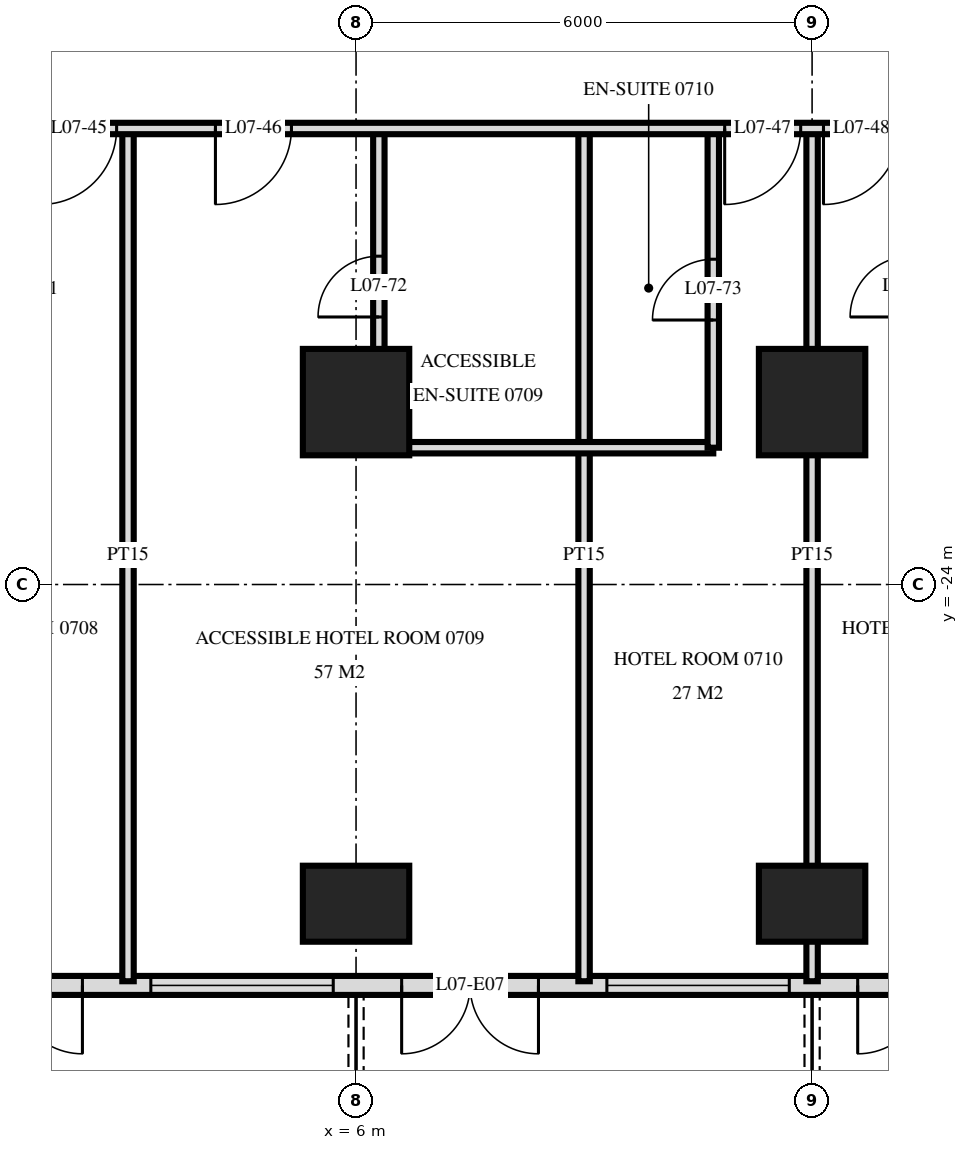
"""IFC4 building model, lengths in metres.
Left out: names, types, materials, properties, quantities, classifications, styles, units other than length and angle.
Written with IfcOpenShell. Run it as: python <this file> out.ifc"""

import sys

from ifc_helpers import new_model, si_unit, direction, frame, frame_2d, origin, origin_2d, place, context, subcontext, project, spatial, rectangle, extrude, element, fill, save


model = new_model("IFC4")
c1 = context("Model", 3, precision=1e-05, world=origin(), true_north=direction((0.0, 1.0)))
c2 = subcontext(c1, "Body", "Model", "MODEL_VIEW")
j1 = project(units=[si_unit("LENGTHUNIT", "METRE"), si_unit("PLANEANGLEUNIT", "RADIAN")], contexts=[c1])
p1 = place(None, origin())
s1 = spatial("IfcSite", under=j1, at=p1, CompositionType="ELEMENT")
p2 = place(p1, origin())
s2 = spatial("IfcBuilding", under=s1, at=p2, CompositionType="ELEMENT")
p3 = place(p2, frame((0.0, 0.0, 34.8)))
s3 = spatial("IfcBuildingStorey", under=s2, at=p3, CompositionType="ELEMENT", Elevation=34.8)
p4 = place(p3, frame((6.0, -28.2, 0.0), z_axis=(0.0, 0.0, 1.0), x_axis=(1.0, 0.0, 0.0)))
e1 = element("IfcColumn", 1, at=p4, inside=s3, PredefinedType="COLUMN", context=c2, shape_type="SweptSolid", body=[
    extrude(rectangle(XDim=1.4, YDim=1.0, at=origin_2d()), origin(), (0.0, 0.0, 1.0), 3.6),
])
p5 = place(p3, frame((6.0, -21.6, 0.0), z_axis=(0.0, 0.0, 1.0), x_axis=(1.0, 0.0, 0.0)))
e2 = element("IfcColumn", 2, at=p5, inside=s3, PredefinedType="COLUMN", context=c2, shape_type="SweptSolid", body=[
    extrude(rectangle(XDim=1.4, YDim=1.4, at=origin_2d()), origin(), (0.0, 0.0, 1.0), 3.6),
])
p6 = place(p3, frame((12.0, -28.2, 0.0), z_axis=(0.0, 0.0, 1.0), x_axis=(1.0, 0.0, 0.0)))
e3 = element("IfcColumn", 3, at=p6, inside=s3, PredefinedType="COLUMN", context=c2, shape_type="SweptSolid", body=[
    extrude(rectangle(XDim=1.4, YDim=1.0, at=origin_2d()), origin(), (0.0, 0.0, 1.0), 3.6),
])
p7 = place(p3, frame((12.0, -21.6, 0.0), z_axis=(0.0, 0.0, 1.0), x_axis=(1.0, 0.0, 0.0)))
e4 = element("IfcColumn", 4, at=p7, inside=s3, PredefinedType="COLUMN", context=c2, shape_type="SweptSolid", body=[
    extrude(rectangle(XDim=1.4, YDim=1.4, at=origin_2d()), origin(), (0.0, 0.0, 1.0), 3.6),
])
p8 = place(p3, frame((-28.775, -29.275, 0.0), z_axis=(0.0, 0.0, 1.0), x_axis=(1.0, 0.0, 0.0)))
e5 = element("IfcWall", 5, at=p8, inside=s3, PredefinedType="SOLIDWALL", context=c2, shape_type="SweptSolid", body=[
    extrude(rectangle(XDim=57.551, YDim=0.25, at=frame_2d((28.775, 0.0))), origin(), (0.0, 0.0, 1.0), 3.32),
])
p9 = place(p8, frame((0.575, 0.0, 0.0)))
e6 = element("IfcOpeningElement", 6, at=p9, cuts=e5, PredefinedType="OPENING", context=c2, shape_type="SweptSolid", body=[
    extrude(rectangle(XDim=1.8, YDim=2.4, at=frame_2d((0.9, 1.2))), frame((0.0, 0.135, 0.0), z_axis=(0.0, -1.0, 0.0), x_axis=(1.0, 0.0, 0.0)), (0.0, 0.0, 1.0), 0.27),
])
p10 = place(p8, frame((5.375, 0.0, 0.0)))
e7 = element("IfcOpeningElement", 7, at=p10, cuts=e5, PredefinedType="OPENING", context=c2, shape_type="SweptSolid", body=[
    extrude(rectangle(XDim=1.8, YDim=2.4, at=frame_2d((0.9, 1.2))), frame((0.0, 0.135, 0.0), z_axis=(0.0, -1.0, 0.0), x_axis=(1.0, 0.0, 0.0)), (0.0, 0.0, 1.0), 0.27),
])
p11 = place(p8, frame((8.075, 0.0, 0.3)))
e8 = element("IfcOpeningElement", 8, at=p11, cuts=e5, PredefinedType="OPENING", context=c2, shape_type="SweptSolid", body=[
    extrude(rectangle(XDim=2.4, YDim=2.1, at=frame_2d((1.2, 1.05))), frame((0.0, 0.135, 0.0), z_axis=(0.0, -1.0, 0.0), x_axis=(1.0, 0.0, 0.0)), (0.0, 0.0, 1.0), 0.27),
])
p12 = place(p8, frame((11.375, 0.0, 0.0)))
e9 = element("IfcOpeningElement", 9, at=p12, cuts=e5, PredefinedType="OPENING", context=c2, shape_type="SweptSolid", body=[
    extrude(rectangle(XDim=1.8, YDim=2.4, at=frame_2d((0.9, 1.2))), frame((0.0, 0.135, 0.0), z_axis=(0.0, -1.0, 0.0), x_axis=(1.0, 0.0, 0.0)), (0.0, 0.0, 1.0), 0.27),
])
p13 = place(p8, frame((14.075, 0.0, 0.3)))
e10 = element("IfcOpeningElement", 10, at=p13, cuts=e5, PredefinedType="OPENING", context=c2, shape_type="SweptSolid", body=[
    extrude(rectangle(XDim=2.4, YDim=2.1, at=frame_2d((1.2, 1.05))), frame((0.0, 0.135, 0.0), z_axis=(0.0, -1.0, 0.0), x_axis=(1.0, 0.0, 0.0)), (0.0, 0.0, 1.0), 0.27),
])
p14 = place(p8, frame((17.375, 0.0, 0.0)))
e11 = element("IfcOpeningElement", 11, at=p14, cuts=e5, PredefinedType="OPENING", context=c2, shape_type="SweptSolid", body=[
    extrude(rectangle(XDim=1.8, YDim=2.4, at=frame_2d((0.9, 1.2))), frame((0.0, 0.135, 0.0), z_axis=(0.0, -1.0, 0.0), x_axis=(1.0, 0.0, 0.0)), (0.0, 0.0, 1.0), 0.27),
])
p15 = place(p8, frame((20.075, 0.0, 0.3)))
e12 = element("IfcOpeningElement", 12, at=p15, cuts=e5, PredefinedType="OPENING", context=c2, shape_type="SweptSolid", body=[
    extrude(rectangle(XDim=2.4, YDim=2.1, at=frame_2d((1.2, 1.05))), frame((0.0, 0.135, 0.0), z_axis=(0.0, -1.0, 0.0), x_axis=(1.0, 0.0, 0.0)), (0.0, 0.0, 1.0), 0.27),
])
p16 = place(p8, frame((23.075, 0.0, 0.3)))
e13 = element("IfcOpeningElement", 13, at=p16, cuts=e5, PredefinedType="OPENING", context=c2, shape_type="SweptSolid", body=[
    extrude(rectangle(XDim=2.4, YDim=2.1, at=frame_2d((1.2, 1.05))), frame((0.0, 0.135, 0.0), z_axis=(0.0, -1.0, 0.0), x_axis=(1.0, 0.0, 0.0)), (0.0, 0.0, 1.0), 0.27),
])
p17 = place(p8, frame((26.375, 0.0, 0.0)))
e14 = element("IfcOpeningElement", 14, at=p17, cuts=e5, PredefinedType="OPENING", context=c2, shape_type="SweptSolid", body=[
    extrude(rectangle(XDim=1.8, YDim=2.4, at=frame_2d((0.9, 1.2))), frame((0.0, 0.135, 0.0), z_axis=(0.0, -1.0, 0.0), x_axis=(1.0, 0.0, 0.0)), (0.0, 0.0, 1.0), 0.27),
])
p18 = place(p8, frame((29.375, 0.0, 0.0)))
e15 = element("IfcOpeningElement", 15, at=p18, cuts=e5, PredefinedType="OPENING", context=c2, shape_type="SweptSolid", body=[
    extrude(rectangle(XDim=1.8, YDim=2.4, at=frame_2d((0.9, 1.2))), frame((0.0, 0.135, 0.0), z_axis=(0.0, -1.0, 0.0), x_axis=(1.0, 0.0, 0.0)), (0.0, 0.0, 1.0), 0.27),
])
p19 = place(p8, frame((32.075, 0.0, 0.3)))
e16 = element("IfcOpeningElement", 16, at=p19, cuts=e5, PredefinedType="OPENING", context=c2, shape_type="SweptSolid", body=[
    extrude(rectangle(XDim=2.4, YDim=2.1, at=frame_2d((1.2, 1.05))), frame((0.0, 0.135, 0.0), z_axis=(0.0, -1.0, 0.0), x_axis=(1.0, 0.0, 0.0)), (0.0, 0.0, 1.0), 0.27),
])
p20 = place(p8, frame((35.375, 0.0, 0.0)))
e17 = element("IfcOpeningElement", 17, at=p20, cuts=e5, PredefinedType="OPENING", context=c2, shape_type="SweptSolid", body=[
    extrude(rectangle(XDim=1.8, YDim=2.4, at=frame_2d((0.9, 1.2))), frame((0.0, 0.135, 0.0), z_axis=(0.0, -1.0, 0.0), x_axis=(1.0, 0.0, 0.0)), (0.0, 0.0, 1.0), 0.27),
])
p21 = place(p8, frame((38.075, 0.0, 0.3)))
e18 = element("IfcOpeningElement", 18, at=p21, cuts=e5, PredefinedType="OPENING", context=c2, shape_type="SweptSolid", body=[
    extrude(rectangle(XDim=2.4, YDim=2.1, at=frame_2d((1.2, 1.05))), frame((0.0, 0.135, 0.0), z_axis=(0.0, -1.0, 0.0), x_axis=(1.0, 0.0, 0.0)), (0.0, 0.0, 1.0), 0.27),
])
p22 = place(p8, frame((41.375, 0.0, 0.0)))
e19 = element("IfcOpeningElement", 19, at=p22, cuts=e5, PredefinedType="OPENING", context=c2, shape_type="SweptSolid", body=[
    extrude(rectangle(XDim=1.8, YDim=2.4, at=frame_2d((0.9, 1.2))), frame((0.0, 0.135, 0.0), z_axis=(0.0, -1.0, 0.0), x_axis=(1.0, 0.0, 0.0)), (0.0, 0.0, 1.0), 0.27),
])
p23 = place(p8, frame((44.075, 0.0, 0.3)))
e20 = element("IfcOpeningElement", 20, at=p23, cuts=e5, PredefinedType="OPENING", context=c2, shape_type="SweptSolid", body=[
    extrude(rectangle(XDim=2.4, YDim=2.1, at=frame_2d((1.2, 1.05))), frame((0.0, 0.135, 0.0), z_axis=(0.0, -1.0, 0.0), x_axis=(1.0, 0.0, 0.0)), (0.0, 0.0, 1.0), 0.27),
])
p24 = place(p8, frame((47.375, 0.0, 0.0)))
e21 = element("IfcOpeningElement", 21, at=p24, cuts=e5, PredefinedType="OPENING", context=c2, shape_type="SweptSolid", body=[
    extrude(rectangle(XDim=1.8, YDim=2.4, at=frame_2d((0.9, 1.2))), frame((0.0, 0.135, 0.0), z_axis=(0.0, -1.0, 0.0), x_axis=(1.0, 0.0, 0.0)), (0.0, 0.0, 1.0), 0.27),
])
p25 = place(p8, frame((50.075, 0.0, 0.3)))
e22 = element("IfcOpeningElement", 22, at=p25, cuts=e5, PredefinedType="OPENING", context=c2, shape_type="SweptSolid", body=[
    extrude(rectangle(XDim=2.4, YDim=2.1, at=frame_2d((1.2, 1.05))), frame((0.0, 0.135, 0.0), z_axis=(0.0, -1.0, 0.0), x_axis=(1.0, 0.0, 0.0)), (0.0, 0.0, 1.0), 0.27),
])
p26 = place(p8, frame((53.375, 0.0, 0.0)))
e23 = element("IfcOpeningElement", 23, at=p26, cuts=e5, PredefinedType="OPENING", context=c2, shape_type="SweptSolid", body=[
    extrude(rectangle(XDim=1.8, YDim=2.4, at=frame_2d((0.9, 1.2))), frame((0.0, 0.135, 0.0), z_axis=(0.0, -1.0, 0.0), x_axis=(1.0, 0.0, 0.0)), (0.0, 0.0, 1.0), 0.27),
])
p27 = place(p3, frame((12.0, -29.22, 0.0), z_axis=(0.0, 0.0, 1.0), x_axis=(0.0, 1.0, 0.0)))
e24 = element("IfcWall", 24, at=p27, inside=s3, PredefinedType="PARTITIONING", context=c2, shape_type="SweptSolid", body=[
    extrude(rectangle(XDim=11.22, YDim=0.15, at=frame_2d((5.61, 0.0))), origin(), (0.0, 0.0, 1.0), 3.32),
])
p28 = place(p3, frame((10.7, -22.2, 0.0), z_axis=(0.0, 0.0, 1.0), x_axis=(0.0, 1.0, 0.0)))
e25 = element("IfcWall", 25, at=p28, inside=s3, PredefinedType="PARTITIONING", context=c2, shape_type="SweptSolid", body=[
    extrude(rectangle(XDim=4.2, YDim=0.15, at=frame_2d((2.1, 0.0))), origin(), (0.0, 0.0, 1.0), 3.32),
])
p29 = place(p28, frame((1.68, 0.0, 0.0)))
e26 = element("IfcOpeningElement", 26, at=p29, cuts=e25, PredefinedType="OPENING", context=c2, shape_type="SweptSolid", body=[
    extrude(rectangle(XDim=0.8, YDim=2.1, at=frame_2d((0.4, 1.05))), frame((0.0, 0.085, 0.0), z_axis=(0.0, -1.0, 0.0), x_axis=(1.0, 0.0, 0.0)), (0.0, 0.0, 1.0), 0.17),
])
p30 = place(p3, frame((9.0, -29.22, 0.0), z_axis=(0.0, 0.0, 1.0), x_axis=(0.0, 1.0, 0.0)))
e27 = element("IfcWall", 27, at=p30, inside=s3, PredefinedType="PARTITIONING", context=c2, shape_type="SweptSolid", body=[
    extrude(rectangle(XDim=11.22, YDim=0.15, at=frame_2d((5.61, 0.0))), origin(), (0.0, 0.0, 1.0), 3.32),
])
p31 = place(p3, frame((6.3, -22.2, 0.0), z_axis=(0.0, 0.0, 1.0), x_axis=(0.0, 1.0, 0.0)))
e28 = element("IfcWall", 28, at=p31, inside=s3, PredefinedType="PARTITIONING", context=c2, shape_type="SweptSolid", body=[
    extrude(rectangle(XDim=4.2, YDim=0.15, at=frame_2d((2.1, 0.0))), origin(), (0.0, 0.0, 1.0), 3.32),
])
p32 = place(p31, frame((1.72, 0.0, 0.0)))
e29 = element("IfcOpeningElement", 29, at=p32, cuts=e28, PredefinedType="OPENING", context=c2, shape_type="SweptSolid", body=[
    extrude(rectangle(XDim=0.8, YDim=2.1, at=frame_2d((0.4, 1.05))), frame((0.0, 0.085, 0.0), z_axis=(0.0, -1.0, 0.0), x_axis=(1.0, 0.0, 0.0)), (0.0, 0.0, 1.0), 0.17),
])
p33 = place(p3, frame((3.0, -29.22, 0.0), z_axis=(0.0, 0.0, 1.0), x_axis=(0.0, 1.0, 0.0)))
e30 = element("IfcWall", 30, at=p33, inside=s3, PredefinedType="PARTITIONING", context=c2, shape_type="SweptSolid", body=[
    extrude(rectangle(XDim=11.22, YDim=0.15, at=frame_2d((5.61, 0.0))), origin(), (0.0, 0.0, 1.0), 3.32),
])
p34 = place(p3, frame((6.3, -22.2, 0.0), z_axis=(0.0, 0.0, 1.0), x_axis=(1.0, 0.0, 0.0)))
e31 = element("IfcWall", 31, at=p34, inside=s3, PredefinedType="PARTITIONING", context=c2, shape_type="SweptSolid", body=[
    extrude(rectangle(XDim=4.4, YDim=0.15, at=frame_2d((2.2, 0.0))), origin(), (0.0, 0.0, 1.0), 3.32),
])
p35 = place(p3, frame((-33.12, -18.0, 0.0), z_axis=(0.0, 0.0, 1.0), x_axis=(1.0, 0.0, 0.0)))
e32 = element("IfcWall", 32, at=p35, inside=s3, PredefinedType="PARTITIONING", context=c2, shape_type="SweptSolid", body=[
    extrude(rectangle(XDim=66.24, YDim=0.15, at=frame_2d((33.12, 0.0))), origin(), (0.0, 0.0, 1.0), 3.32),
])
p36 = place(p35, frame((12.27, 0.0, 0.0)))
e33 = element("IfcOpeningElement", 33, at=p36, cuts=e32, PredefinedType="OPENING", context=c2, shape_type="SweptSolid", body=[
    extrude(rectangle(XDim=1.0, YDim=2.1, at=frame_2d((0.5, 1.05))), frame((0.0, 0.085, 0.0), z_axis=(0.0, -1.0, 0.0), x_axis=(1.0, 0.0, 0.0)), (0.0, 0.0, 1.0), 0.17),
])
p37 = place(p35, frame((16.97, 0.0, 0.0)))
e34 = element("IfcOpeningElement", 34, at=p37, cuts=e32, PredefinedType="OPENING", context=c2, shape_type="SweptSolid", body=[
    extrude(rectangle(XDim=1.0, YDim=2.1, at=frame_2d((0.5, 1.05))), frame((0.0, 0.085, 0.0), z_axis=(0.0, -1.0, 0.0), x_axis=(1.0, 0.0, 0.0)), (0.0, 0.0, 1.0), 0.17),
])
p38 = place(p35, frame((18.27, 0.0, 0.0)))
e35 = element("IfcOpeningElement", 35, at=p38, cuts=e32, PredefinedType="OPENING", context=c2, shape_type="SweptSolid", body=[
    extrude(rectangle(XDim=1.0, YDim=2.1, at=frame_2d((0.5, 1.05))), frame((0.0, 0.085, 0.0), z_axis=(0.0, -1.0, 0.0), x_axis=(1.0, 0.0, 0.0)), (0.0, 0.0, 1.0), 0.17),
])
p39 = place(p35, frame((22.97, 0.0, 0.0)))
e36 = element("IfcOpeningElement", 36, at=p39, cuts=e32, PredefinedType="OPENING", context=c2, shape_type="SweptSolid", body=[
    extrude(rectangle(XDim=1.0, YDim=2.1, at=frame_2d((0.5, 1.05))), frame((0.0, 0.085, 0.0), z_axis=(0.0, -1.0, 0.0), x_axis=(1.0, 0.0, 0.0)), (0.0, 0.0, 1.0), 0.17),
])
p40 = place(p35, frame((24.27, 0.0, 0.0)))
e37 = element("IfcOpeningElement", 37, at=p40, cuts=e32, PredefinedType="OPENING", context=c2, shape_type="SweptSolid", body=[
    extrude(rectangle(XDim=1.0, YDim=2.1, at=frame_2d((0.5, 1.05))), frame((0.0, 0.085, 0.0), z_axis=(0.0, -1.0, 0.0), x_axis=(1.0, 0.0, 0.0)), (0.0, 0.0, 1.0), 0.17),
])
p41 = place(p35, frame((28.97, 0.0, 0.0)))
e38 = element("IfcOpeningElement", 38, at=p41, cuts=e32, PredefinedType="OPENING", context=c2, shape_type="SweptSolid", body=[
    extrude(rectangle(XDim=1.0, YDim=2.1, at=frame_2d((0.5, 1.05))), frame((0.0, 0.085, 0.0), z_axis=(0.0, -1.0, 0.0), x_axis=(1.0, 0.0, 0.0)), (0.0, 0.0, 1.0), 0.17),
])
p42 = place(p35, frame((30.27, 0.0, 0.0)))
e39 = element("IfcOpeningElement", 39, at=p42, cuts=e32, PredefinedType="OPENING", context=c2, shape_type="SweptSolid", body=[
    extrude(rectangle(XDim=1.0, YDim=2.1, at=frame_2d((0.5, 1.05))), frame((0.0, 0.085, 0.0), z_axis=(0.0, -1.0, 0.0), x_axis=(1.0, 0.0, 0.0)), (0.0, 0.0, 1.0), 0.17),
])
p43 = place(p35, frame((34.97, 0.0, 0.0)))
e40 = element("IfcOpeningElement", 40, at=p43, cuts=e32, PredefinedType="OPENING", context=c2, shape_type="SweptSolid", body=[
    extrude(rectangle(XDim=1.0, YDim=2.1, at=frame_2d((0.5, 1.05))), frame((0.0, 0.085, 0.0), z_axis=(0.0, -1.0, 0.0), x_axis=(1.0, 0.0, 0.0)), (0.0, 0.0, 1.0), 0.17),
])
p44 = place(p35, frame((37.27, 0.0, 0.0)))
e41 = element("IfcOpeningElement", 41, at=p44, cuts=e32, PredefinedType="OPENING", context=c2, shape_type="SweptSolid", body=[
    extrude(rectangle(XDim=1.0, YDim=2.1, at=frame_2d((0.5, 1.05))), frame((0.0, 0.085, 0.0), z_axis=(0.0, -1.0, 0.0), x_axis=(1.0, 0.0, 0.0)), (0.0, 0.0, 1.0), 0.17),
])
p45 = place(p35, frame((43.97, 0.0, 0.0)))
e42 = element("IfcOpeningElement", 42, at=p45, cuts=e32, PredefinedType="OPENING", context=c2, shape_type="SweptSolid", body=[
    extrude(rectangle(XDim=1.0, YDim=2.1, at=frame_2d((0.5, 1.05))), frame((0.0, 0.085, 0.0), z_axis=(0.0, -1.0, 0.0), x_axis=(1.0, 0.0, 0.0)), (0.0, 0.0, 1.0), 0.17),
])
p46 = place(p35, frame((45.27, 0.0, 0.0)))
e43 = element("IfcOpeningElement", 43, at=p46, cuts=e32, PredefinedType="OPENING", context=c2, shape_type="SweptSolid", body=[
    extrude(rectangle(XDim=1.0, YDim=2.1, at=frame_2d((0.5, 1.05))), frame((0.0, 0.085, 0.0), z_axis=(0.0, -1.0, 0.0), x_axis=(1.0, 0.0, 0.0)), (0.0, 0.0, 1.0), 0.17),
])
p47 = place(p35, frame((51.22, 0.0, 0.0)))
e44 = element("IfcOpeningElement", 44, at=p47, cuts=e32, PredefinedType="OPENING", context=c2, shape_type="SweptSolid", body=[
    extrude(rectangle(XDim=1.0, YDim=2.1, at=frame_2d((0.5, 1.05))), frame((0.0, 0.085, 0.0), z_axis=(0.0, -1.0, 0.0), x_axis=(1.0, 0.0, 0.0)), (0.0, 0.0, 1.0), 0.17),
])
p48 = place(p35, frame((54.27, 0.0, 0.0)))
e45 = element("IfcOpeningElement", 45, at=p48, cuts=e32, PredefinedType="OPENING", context=c2, shape_type="SweptSolid", body=[
    extrude(rectangle(XDim=1.0, YDim=2.1, at=frame_2d((0.5, 1.05))), frame((0.0, 0.085, 0.0), z_axis=(0.0, -1.0, 0.0), x_axis=(1.0, 0.0, 0.0)), (0.0, 0.0, 1.0), 0.17),
])
p49 = place(p35, frame((6.07, 0.0, 0.0)))
e46 = element("IfcOpeningElement", 46, at=p49, cuts=e32, PredefinedType="OPENING", context=c2, shape_type="SweptSolid", body=[
    extrude(rectangle(XDim=1.0, YDim=2.1, at=frame_2d((0.5, 1.05))), frame((0.0, 0.085, 0.0), z_axis=(0.0, -1.0, 0.0), x_axis=(1.0, 0.0, 0.0)), (0.0, 0.0, 1.0), 0.17),
])
p50 = place(p35, frame((63.37, 0.0, 0.0)))
e47 = element("IfcOpeningElement", 47, at=p50, cuts=e32, PredefinedType="OPENING", context=c2, shape_type="SweptSolid", body=[
    extrude(rectangle(XDim=1.0, YDim=2.1, at=frame_2d((0.5, 1.05))), frame((0.0, 0.085, 0.0), z_axis=(0.0, -1.0, 0.0), x_axis=(1.0, 0.0, 0.0)), (0.0, 0.0, 1.0), 0.17),
])
p51 = place(p18, frame((0.9, 0.0, 0.0), z_axis=(0.0, 0.0, 1.0), x_axis=(-1.0, 0.0, 0.0)))
e48 = element("IfcDoor", 48, at=p51, inside=s3, OperationType="DOUBLE_DOOR_SINGLE_SWING", PredefinedType="DOOR", context=c2, shape_type="SweptSolid", body=[
    extrude(rectangle(XDim=1.8, YDim=2.4, at=frame_2d((0.0, 1.2))), frame((0.0, -0.025, 0.0), z_axis=(0.0, 1.0, 0.0), x_axis=(-1.0, 0.0, 0.0)), (0.0, 0.0, 1.0), 0.05),
])
fill(e15, e48)
p52 = place(p19, origin())
e49 = element("IfcWindow", 49, at=p52, inside=s3, PartitioningType="SINGLE_PANEL", PredefinedType="WINDOW", context=c2, shape_type="SweptSolid", body=[
    extrude(rectangle(XDim=2.4, YDim=2.1, at=frame_2d((1.2, 1.05))), frame((0.0, 0.03, 0.0), z_axis=(0.0, -1.0, 0.0), x_axis=(1.0, 0.0, 0.0)), (0.0, 0.0, 1.0), 0.06),
])
fill(e16, e49)
p53 = place(p20, frame((0.9, 0.0, 0.0), z_axis=(0.0, 0.0, 1.0), x_axis=(-1.0, 0.0, 0.0)))
e50 = element("IfcDoor", 50, at=p53, inside=s3, OperationType="DOUBLE_DOOR_SINGLE_SWING", PredefinedType="DOOR", context=c2, shape_type="SweptSolid", body=[
    extrude(rectangle(XDim=1.8, YDim=2.4, at=frame_2d((0.0, 1.2))), frame((0.0, -0.025, 0.0), z_axis=(0.0, 1.0, 0.0), x_axis=(-1.0, 0.0, 0.0)), (0.0, 0.0, 1.0), 0.05),
])
fill(e17, e50)
p54 = place(p21, origin())
e51 = element("IfcWindow", 51, at=p54, inside=s3, PartitioningType="SINGLE_PANEL", PredefinedType="WINDOW", context=c2, shape_type="SweptSolid", body=[
    extrude(rectangle(XDim=2.4, YDim=2.1, at=frame_2d((1.2, 1.05))), frame((0.0, 0.03, 0.0), z_axis=(0.0, -1.0, 0.0), x_axis=(1.0, 0.0, 0.0)), (0.0, 0.0, 1.0), 0.06),
])
fill(e18, e51)
p55 = place(p22, frame((0.9, 0.0, 0.0), z_axis=(0.0, 0.0, 1.0), x_axis=(-1.0, 0.0, 0.0)))
e52 = element("IfcDoor", 52, at=p55, inside=s3, OperationType="DOUBLE_DOOR_SINGLE_SWING", PredefinedType="DOOR", context=c2, shape_type="SweptSolid", body=[
    extrude(rectangle(XDim=1.8, YDim=2.4, at=frame_2d((0.0, 1.2))), frame((0.0, -0.025, 0.0), z_axis=(0.0, 1.0, 0.0), x_axis=(-1.0, 0.0, 0.0)), (0.0, 0.0, 1.0), 0.05),
])
fill(e19, e52)
p56 = place(p43, frame((0.5, 0.0, 0.0), z_axis=(0.0, 0.0, 1.0), x_axis=(-1.0, 0.0, 0.0)))
e53 = element("IfcDoor", 53, at=p56, inside=s3, OperationType="SINGLE_SWING_LEFT", PredefinedType="DOOR", context=c2, shape_type="SweptSolid", body=[
    extrude(rectangle(XDim=1.0, YDim=2.1, at=frame_2d((0.0, 1.05))), frame((0.0, -0.025, 0.0), z_axis=(0.0, 1.0, 0.0), x_axis=(-1.0, 0.0, 0.0)), (0.0, 0.0, 1.0), 0.05),
])
fill(e40, e53)
p57 = place(p44, frame((0.5, 0.0, 0.0), z_axis=(0.0, 0.0, 1.0), x_axis=(-1.0, 0.0, 0.0)))
e54 = element("IfcDoor", 54, at=p57, inside=s3, OperationType="SINGLE_SWING_LEFT", PredefinedType="DOOR", context=c2, shape_type="SweptSolid", body=[
    extrude(rectangle(XDim=1.0, YDim=2.1, at=frame_2d((0.0, 1.05))), frame((0.0, -0.025, 0.0), z_axis=(0.0, 1.0, 0.0), x_axis=(-1.0, 0.0, 0.0)), (0.0, 0.0, 1.0), 0.05),
])
fill(e41, e54)
p58 = place(p45, frame((0.5, 0.0, 0.0), z_axis=(0.0, 0.0, 1.0), x_axis=(-1.0, 0.0, 0.0)))
e55 = element("IfcDoor", 55, at=p58, inside=s3, OperationType="SINGLE_SWING_LEFT", PredefinedType="DOOR", context=c2, shape_type="SweptSolid", body=[
    extrude(rectangle(XDim=1.0, YDim=2.1, at=frame_2d((0.0, 1.05))), frame((0.0, -0.025, 0.0), z_axis=(0.0, 1.0, 0.0), x_axis=(-1.0, 0.0, 0.0)), (0.0, 0.0, 1.0), 0.05),
])
fill(e42, e55)
p59 = place(p46, frame((0.5, 0.0, 0.0), z_axis=(0.0, 0.0, 1.0), x_axis=(-1.0, 0.0, 0.0)))
e56 = element("IfcDoor", 56, at=p59, inside=s3, OperationType="SINGLE_SWING_LEFT", PredefinedType="DOOR", context=c2, shape_type="SweptSolid", body=[
    extrude(rectangle(XDim=1.0, YDim=2.1, at=frame_2d((0.0, 1.05))), frame((0.0, -0.025, 0.0), z_axis=(0.0, 1.0, 0.0), x_axis=(-1.0, 0.0, 0.0)), (0.0, 0.0, 1.0), 0.05),
])
fill(e43, e56)
p60 = place(p32, origin())
e57 = element("IfcDoor", 57, at=p60, inside=s3, OperationType="SINGLE_SWING_RIGHT", PredefinedType="DOOR", context=c2, shape_type="SweptSolid", body=[
    extrude(rectangle(XDim=0.8, YDim=2.1, at=frame_2d((0.4, 1.05))), frame((0.0, 0.025, 0.0), z_axis=(0.0, -1.0, 0.0), x_axis=(1.0, 0.0, 0.0)), (0.0, 0.0, 1.0), 0.05),
])
fill(e29, e57)
p61 = place(p29, origin())
e58 = element("IfcDoor", 58, at=p61, inside=s3, OperationType="SINGLE_SWING_RIGHT", PredefinedType="DOOR", context=c2, shape_type="SweptSolid", body=[
    extrude(rectangle(XDim=0.8, YDim=2.1, at=frame_2d((0.4, 1.05))), frame((0.0, 0.025, 0.0), z_axis=(0.0, -1.0, 0.0), x_axis=(1.0, 0.0, 0.0)), (0.0, 0.0, 1.0), 0.05),
])
fill(e26, e58)
save(model, sys.argv[1])
